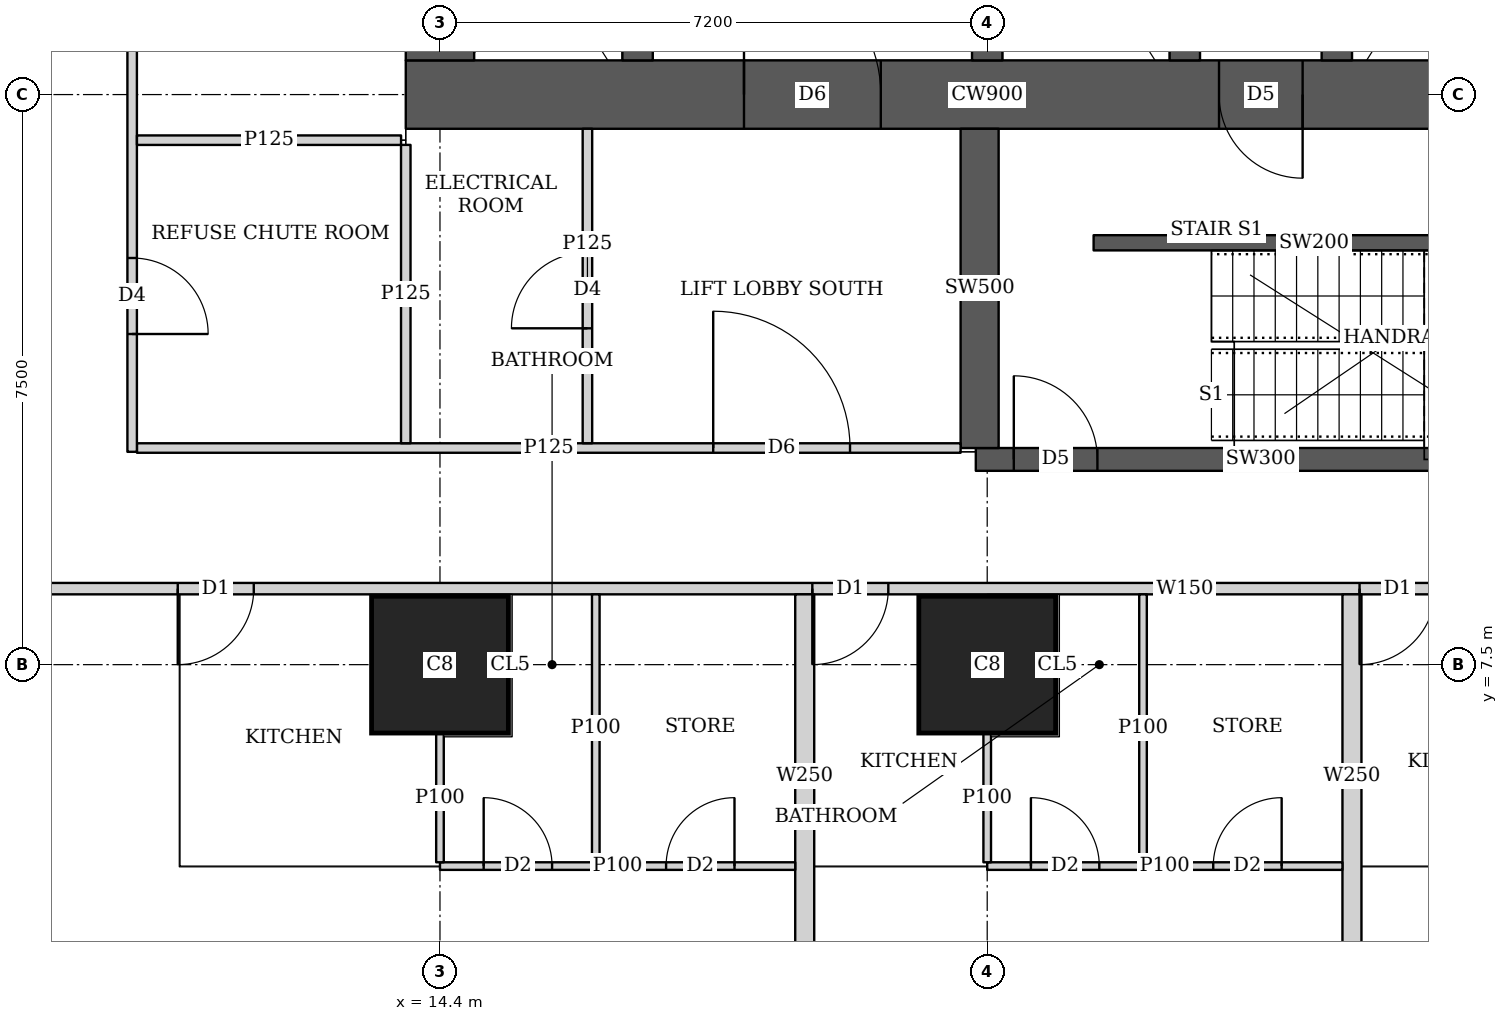
"""IFC4 building model, lengths in metres.
Left out: names, types, materials, properties, quantities, classifications, styles, units other than length and angle.
Written with IfcOpenShell. Run it as: python <this file> out.ifc"""

import sys

from ifc_helpers import new_model, si_unit, direction, frame, frame_2d, origin, origin_2d, place, context, subcontext, project, spatial, rectangle, extrude, element, fill, save


model = new_model("IFC4")
c1 = context("Model", 3, precision=1e-05, world=origin(), true_north=direction((0.0, 1.0)))
c2 = subcontext(c1, "Body", "Model", "MODEL_VIEW")
j1 = project(units=[si_unit("LENGTHUNIT", "METRE"), si_unit("PLANEANGLEUNIT", "RADIAN")], contexts=[c1])
p1 = place(None, origin())
s1 = spatial("IfcSite", under=j1, at=p1, CompositionType="ELEMENT")
p2 = place(p1, origin())
s2 = spatial("IfcBuilding", under=s1, at=p2, CompositionType="ELEMENT")
p3 = place(p2, frame((0.0, 0.0, 65.0)))
s3 = spatial("IfcBuildingStorey", under=s2, at=p3, CompositionType="ELEMENT", Elevation=65.0)
for number, where, z_axis, x_axis in (
    (1, (14.4, 7.5, 0.0), (0.0, 0.0, 1.0), (1.0, 0.0, 0.0)),
    (2, (21.6, 7.5, 0.0), (0.0, 0.0, 1.0), (1.0, 0.0, 0.0)),
):
    element("IfcColumn", number, at=place(p3, frame(where, z_axis=z_axis, x_axis=x_axis)), inside=s3, PredefinedType="COLUMN", context=c2, shape_type="SweptSolid", body=[
        extrude(rectangle(XDim=1.8, YDim=1.8, at=origin_2d()), origin(), (0.0, 0.0, 1.0), 3.75),
    ])
p4 = place(p3, frame((13.95, 15.0, 0.0), z_axis=(0.0, 0.0, 1.0), x_axis=(1.0, 0.0, 0.0)))
e3 = element("IfcWall", 3, at=p4, inside=s3, PredefinedType="SHEAR", context=c2, shape_type="SweptSolid", body=[
    extrude(rectangle(XDim=15.3, YDim=0.9, at=frame_2d((7.65, 0.0))), origin(), (0.0, 0.0, 1.0), 3.75),
])
p5 = place(p4, frame((4.45, 0.0, 0.0)))
e4 = element("IfcOpeningElement", 4, at=p5, cuts=e3, PredefinedType="OPENING", context=c2, shape_type="SweptSolid", body=[
    extrude(rectangle(XDim=1.8, YDim=2.1, at=frame_2d((0.9, 1.05))), frame((0.0, 0.46, 0.0), z_axis=(0.0, -1.0, 0.0), x_axis=(1.0, 0.0, 0.0)), (0.0, 0.0, 1.0), 0.92),
])
p6 = place(p4, frame((10.7, 0.0, 0.0)))
e5 = element("IfcOpeningElement", 5, at=p6, cuts=e3, PredefinedType="OPENING", context=c2, shape_type="SweptSolid", body=[
    extrude(rectangle(XDim=1.1, YDim=2.1, at=frame_2d((0.55, 1.05))), frame((0.0, 0.46, 0.0), z_axis=(0.0, -1.0, 0.0), x_axis=(1.0, 0.0, 0.0)), (0.0, 0.0, 1.0), 0.92),
])
p7 = place(p3, frame((14.4, 15.45, 0.0), z_axis=(0.0, 0.0, 1.0), x_axis=(0.0, 1.0, 0.0)))
e6 = element("IfcWall", 6, at=p7, inside=s3, PredefinedType="SHEAR", context=c2, shape_type="SweptSolid", body=[
    extrude(rectangle(XDim=14.1, YDim=0.9, at=frame_2d((7.05, 0.0))), origin(), (0.0, 0.0, 1.0), 3.75),
])
p8 = place(p3, frame((17.0, 15.45, 0.0), z_axis=(0.0, 0.0, 1.0), x_axis=(0.0, 1.0, 0.0)))
e7 = element("IfcWall", 7, at=p8, inside=s3, PredefinedType="SHEAR", context=c2, shape_type="SweptSolid", body=[
    extrude(rectangle(XDim=14.1, YDim=0.4, at=frame_2d((7.05, 0.0))), origin(), (0.0, 0.0, 1.0), 3.75),
])
p9 = place(p8, frame((0.875, 0.0, 0.0)))
e8 = element("IfcOpeningElement", 8, at=p9, cuts=e7, PredefinedType="OPENING", context=c2, shape_type="SweptSolid", body=[
    extrude(rectangle(XDim=1.1, YDim=2.1, at=frame_2d((0.55, 1.05))), frame((0.0, 0.21, 0.0), z_axis=(0.0, -1.0, 0.0), x_axis=(1.0, 0.0, 0.0)), (0.0, 0.0, 1.0), 0.42),
])
p10 = place(p8, frame((4.625, 0.0, 0.0)))
e9 = element("IfcOpeningElement", 9, at=p10, cuts=e7, PredefinedType="OPENING", context=c2, shape_type="SweptSolid", body=[
    extrude(rectangle(XDim=1.1, YDim=2.1, at=frame_2d((0.55, 1.05))), frame((0.0, 0.21, 0.0), z_axis=(0.0, -1.0, 0.0), x_axis=(1.0, 0.0, 0.0)), (0.0, 0.0, 1.0), 0.42),
])
p11 = place(p8, frame((8.375, 0.0, 0.0)))
e10 = element("IfcOpeningElement", 10, at=p11, cuts=e7, PredefinedType="OPENING", context=c2, shape_type="SweptSolid", body=[
    extrude(rectangle(XDim=1.1, YDim=2.1, at=frame_2d((0.55, 1.05))), frame((0.0, 0.21, 0.0), z_axis=(0.0, -1.0, 0.0), x_axis=(1.0, 0.0, 0.0)), (0.0, 0.0, 1.0), 0.42),
])
p12 = place(p8, frame((12.125, 0.0, 0.0)))
e11 = element("IfcOpeningElement", 11, at=p12, cuts=e7, PredefinedType="OPENING", context=c2, shape_type="SweptSolid", body=[
    extrude(rectangle(XDim=1.1, YDim=2.1, at=frame_2d((0.55, 1.05))), frame((0.0, 0.21, 0.0), z_axis=(0.0, -1.0, 0.0), x_axis=(1.0, 0.0, 0.0)), (0.0, 0.0, 1.0), 0.42),
])
for number, where, z_axis, x_axis in (
    (12, (21.6, 15.45, 0.0), (0.0, 0.0, 1.0), (0.0, 1.0, 0.0)),
    (13, (24.2, 15.45, 0.0), (0.0, 0.0, 1.0), (0.0, 1.0, 0.0)),
):
    element("IfcWall", number, at=place(p3, frame(where, z_axis=z_axis, x_axis=x_axis)), inside=s3, PredefinedType="SHEAR", context=c2, shape_type="SweptSolid", body=[
        extrude(rectangle(XDim=14.1, YDim=0.4, at=frame_2d((7.05, 0.0))), origin(), (0.0, 0.0, 1.0), 3.75),
    ])
p13 = place(p3, frame((26.2, 15.45, 0.0), z_axis=(0.0, 0.0, 1.0), x_axis=(0.0, 1.0, 0.0)))
e14 = element("IfcWall", 14, at=p13, inside=s3, PredefinedType="SHEAR", context=c2, shape_type="SweptSolid", body=[
    extrude(rectangle(XDim=3.1, YDim=0.4, at=frame_2d((1.55, 0.0))), origin(), (0.0, 0.0, 1.0), 3.75),
])
p14 = place(p13, frame((0.825, 0.0, 0.0)))
e15 = element("IfcOpeningElement", 15, at=p14, cuts=e14, PredefinedType="OPENING", context=c2, shape_type="SweptSolid", body=[
    extrude(rectangle(XDim=1.2, YDim=2.1, at=frame_2d((0.6, 1.05))), frame((0.0, 0.21, 0.0), z_axis=(0.0, -1.0, 0.0), x_axis=(1.0, 0.0, 0.0)), (0.0, 0.0, 1.0), 0.42),
])
p15 = place(p3, frame((21.45, 10.2, 0.0), z_axis=(0.0, 0.0, 1.0), x_axis=(1.0, 0.0, 0.0)))
e16 = element("IfcWall", 16, at=p15, inside=s3, PredefinedType="SHEAR", context=c2, shape_type="SweptSolid", body=[
    extrude(rectangle(XDim=7.5, YDim=0.3, at=frame_2d((3.75, 0.0))), origin(), (0.0, 0.0, 1.0), 3.75),
])
p16 = place(p15, frame((0.5, 0.0, 0.0)))
e17 = element("IfcOpeningElement", 17, at=p16, cuts=e16, PredefinedType="OPENING", context=c2, shape_type="SweptSolid", body=[
    extrude(rectangle(XDim=1.1, YDim=2.1, at=frame_2d((0.55, 1.05))), frame((0.0, 0.16, 0.0), z_axis=(0.0, -1.0, 0.0), x_axis=(1.0, 0.0, 0.0)), (0.0, 0.0, 1.0), 0.32),
])
p17 = place(p3, frame((21.5, 10.35, 0.0), z_axis=(0.0, 0.0, 1.0), x_axis=(0.0, 1.0, 0.0)))
e18 = element("IfcWall", 18, at=p17, inside=s3, PredefinedType="SHEAR", context=c2, shape_type="SweptSolid", body=[
    extrude(rectangle(XDim=4.2, YDim=0.5, at=frame_2d((2.1, 0.0))), origin(), (0.0, 0.0, 1.0), 3.75),
])
p18 = place(p3, frame((40.054, 8.5, 0.0), z_axis=(0.0, 0.0, 1.0), x_axis=(-1.0, 0.0, 0.0)))
e19 = element("IfcWall", 19, at=p18, inside=s3, PredefinedType="SOLIDWALL", context=c2, shape_type="SweptSolid", body=[
    extrude(rectangle(XDim=31.704, YDim=0.15, at=frame_2d((15.852, 0.0))), origin(), (0.0, 0.0, 1.0), 3.5),
])
p19 = place(p18, frame((28.104, 0.0, 0.0)))
e20 = element("IfcOpeningElement", 20, at=p19, cuts=e19, PredefinedType="OPENING", context=c2, shape_type="SweptSolid", body=[
    extrude(rectangle(XDim=1.0, YDim=2.1, at=frame_2d((0.5, 1.05))), frame((0.0, 0.085, 0.0), z_axis=(0.0, -1.0, 0.0), x_axis=(1.0, 0.0, 0.0)), (0.0, 0.0, 1.0), 0.17),
])
p20 = place(p18, frame((19.755, 0.0, 0.0)))
e21 = element("IfcOpeningElement", 21, at=p20, cuts=e19, PredefinedType="OPENING", context=c2, shape_type="SweptSolid", body=[
    extrude(rectangle(XDim=1.0, YDim=2.1, at=frame_2d((0.5, 1.05))), frame((0.0, 0.085, 0.0), z_axis=(0.0, -1.0, 0.0), x_axis=(1.0, 0.0, 0.0)), (0.0, 0.0, 1.0), 0.17),
])
p21 = place(p18, frame((12.555, 0.0, 0.0)))
e22 = element("IfcOpeningElement", 22, at=p21, cuts=e19, PredefinedType="OPENING", context=c2, shape_type="SweptSolid", body=[
    extrude(rectangle(XDim=1.0, YDim=2.1, at=frame_2d((0.5, 1.05))), frame((0.0, 0.085, 0.0), z_axis=(0.0, -1.0, 0.0), x_axis=(1.0, 0.0, 0.0)), (0.0, 0.0, 1.0), 0.17),
])
p22 = place(p18, frame((5.355, 0.0, 0.0)))
e23 = element("IfcOpeningElement", 23, at=p22, cuts=e19, PredefinedType="OPENING", context=c2, shape_type="SweptSolid", body=[
    extrude(rectangle(XDim=1.0, YDim=2.1, at=frame_2d((0.5, 1.05))), frame((0.0, 0.085, 0.0), z_axis=(0.0, -1.0, 0.0), x_axis=(1.0, 0.0, 0.0)), (0.0, 0.0, 1.0), 0.17),
])
p23 = place(p3, frame((19.074, 4.85, 0.0), z_axis=(0.0, 0.0, 1.0), x_axis=(-1.0, 0.0, 0.0)))
e24 = element("IfcWall", 24, at=p23, inside=s3, PredefinedType="PARTITIONING", context=c2, shape_type="SweptSolid", body=[
    extrude(rectangle(XDim=4.674, YDim=0.1, at=frame_2d((2.337, 0.0))), origin(), (0.0, 0.0, 1.0), 3.5),
])
p24 = place(p23, frame((3.199, 0.0, 0.0)))
e25 = element("IfcOpeningElement", 25, at=p24, cuts=e24, PredefinedType="OPENING", context=c2, shape_type="SweptSolid", body=[
    extrude(rectangle(XDim=0.9, YDim=2.1, at=frame_2d((0.45, 1.05))), frame((0.0, 0.06, 0.0), z_axis=(0.0, -1.0, 0.0), x_axis=(1.0, 0.0, 0.0)), (0.0, 0.0, 1.0), 0.12),
])
p25 = place(p23, frame((0.799, 0.0, 0.0)))
e26 = element("IfcOpeningElement", 26, at=p25, cuts=e24, PredefinedType="OPENING", context=c2, shape_type="SweptSolid", body=[
    extrude(rectangle(XDim=0.9, YDim=2.1, at=frame_2d((0.45, 1.05))), frame((0.0, 0.06, 0.0), z_axis=(0.0, -1.0, 0.0), x_axis=(1.0, 0.0, 0.0)), (0.0, 0.0, 1.0), 0.12),
])
p26 = place(p3, frame((14.4, 4.9, 0.0), z_axis=(0.0, 0.0, 1.0), x_axis=(0.0, 1.0, 0.0)))
e27 = element("IfcWall", 27, at=p26, inside=s3, PredefinedType="PARTITIONING", context=c2, shape_type="SweptSolid", body=[
    extrude(rectangle(XDim=1.699, YDim=0.1, at=frame_2d((0.85, 0.0))), origin(), (0.0, 0.0, 1.0), 3.5),
])
p27 = place(p3, frame((16.45, 4.9, 0.0), z_axis=(0.0, 0.0, 1.0), x_axis=(0.0, 1.0, 0.0)))
e28 = element("IfcWall", 28, at=p27, inside=s3, PredefinedType="PARTITIONING", context=c2, shape_type="SweptSolid", body=[
    extrude(rectangle(XDim=3.525, YDim=0.1, at=frame_2d((1.763, 0.0))), origin(), (0.0, 0.0, 1.0), 3.5),
])
p28 = place(p3, frame((26.274, 4.85, 0.0), z_axis=(0.0, 0.0, 1.0), x_axis=(-1.0, 0.0, 0.0)))
e29 = element("IfcWall", 29, at=p28, inside=s3, PredefinedType="PARTITIONING", context=c2, shape_type="SweptSolid", body=[
    extrude(rectangle(XDim=4.674, YDim=0.1, at=frame_2d((2.337, 0.0))), origin(), (0.0, 0.0, 1.0), 3.5),
])
p29 = place(p28, frame((3.199, 0.0, 0.0)))
e30 = element("IfcOpeningElement", 30, at=p29, cuts=e29, PredefinedType="OPENING", context=c2, shape_type="SweptSolid", body=[
    extrude(rectangle(XDim=0.9, YDim=2.1, at=frame_2d((0.45, 1.05))), frame((0.0, 0.06, 0.0), z_axis=(0.0, -1.0, 0.0), x_axis=(1.0, 0.0, 0.0)), (0.0, 0.0, 1.0), 0.12),
])
p30 = place(p28, frame((0.8, 0.0, 0.0)))
e31 = element("IfcOpeningElement", 31, at=p30, cuts=e29, PredefinedType="OPENING", context=c2, shape_type="SweptSolid", body=[
    extrude(rectangle(XDim=0.9, YDim=2.1, at=frame_2d((0.45, 1.05))), frame((0.0, 0.06, 0.0), z_axis=(0.0, -1.0, 0.0), x_axis=(1.0, 0.0, 0.0)), (0.0, 0.0, 1.0), 0.12),
])
p31 = place(p3, frame((21.6, 4.9, 0.0), z_axis=(0.0, 0.0, 1.0), x_axis=(0.0, 1.0, 0.0)))
e32 = element("IfcWall", 32, at=p31, inside=s3, PredefinedType="PARTITIONING", context=c2, shape_type="SweptSolid", body=[
    extrude(rectangle(XDim=1.699, YDim=0.1, at=frame_2d((0.85, 0.0))), origin(), (0.0, 0.0, 1.0), 3.5),
])
p32 = place(p3, frame((23.65, 4.9, 0.0), z_axis=(0.0, 0.0, 1.0), x_axis=(0.0, 1.0, 0.0)))
e33 = element("IfcWall", 33, at=p32, inside=s3, PredefinedType="PARTITIONING", context=c2, shape_type="SweptSolid", body=[
    extrude(rectangle(XDim=3.525, YDim=0.1, at=frame_2d((1.763, 0.0))), origin(), (0.0, 0.0, 1.0), 3.5),
])
for number, where, z_axis, x_axis in (
    (34, (19.199, 3.65, 0.0), (0.0, 0.0, 1.0), (0.0, 1.0, 0.0)),
    (35, (26.399, 3.65, 0.0), (0.0, 0.0, 1.0), (0.0, 1.0, 0.0)),
):
    element("IfcWall", number, at=place(p3, frame(where, z_axis=z_axis, x_axis=x_axis)), inside=s3, PredefinedType="SOLIDWALL", context=c2, shape_type="SweptSolid", body=[
        extrude(rectangle(XDim=4.775, YDim=0.25, at=frame_2d((2.388, 0.0))), origin(), (0.0, 0.0, 1.0), 3.5),
    ])
p33 = place(p3, frame((10.35, 10.3, 0.0), z_axis=(0.0, 0.0, 1.0), x_axis=(0.0, 1.0, 0.0)))
e36 = element("IfcWall", 36, at=p33, inside=s3, PredefinedType="PARTITIONING", context=c2, shape_type="SweptSolid", body=[
    extrude(rectangle(XDim=24.4, YDim=0.125, at=frame_2d((12.2, 0.0))), origin(), (0.0, 0.0, 1.0), 3.5),
])
p34 = place(p33, frame((1.55, 0.0, 0.0)))
e37 = element("IfcOpeningElement", 37, at=p34, cuts=e36, PredefinedType="OPENING", context=c2, shape_type="SweptSolid", body=[
    extrude(rectangle(XDim=1.0, YDim=2.1, at=frame_2d((0.5, 1.05))), frame((0.0, 0.073, 0.0), z_axis=(0.0, -1.0, 0.0), x_axis=(1.0, 0.0, 0.0)), (0.0, 0.0, 1.0), 0.145),
])
p35 = place(p33, frame((7.65, 0.0, 0.0)))
e38 = element("IfcOpeningElement", 38, at=p35, cuts=e36, PredefinedType="OPENING", context=c2, shape_type="SweptSolid", body=[
    extrude(rectangle(XDim=1.0, YDim=2.1, at=frame_2d((0.5, 1.05))), frame((0.0, 0.073, 0.0), z_axis=(0.0, -1.0, 0.0), x_axis=(1.0, 0.0, 0.0)), (0.0, 0.0, 1.0), 0.145),
])
p36 = place(p33, frame((15.75, 0.0, 0.0)))
e39 = element("IfcOpeningElement", 39, at=p36, cuts=e36, PredefinedType="OPENING", context=c2, shape_type="SweptSolid", body=[
    extrude(rectangle(XDim=1.0, YDim=2.1, at=frame_2d((0.5, 1.05))), frame((0.0, 0.073, 0.0), z_axis=(0.0, -1.0, 0.0), x_axis=(1.0, 0.0, 0.0)), (0.0, 0.0, 1.0), 0.145),
])
p37 = place(p33, frame((21.85, 0.0, 0.0)))
e40 = element("IfcOpeningElement", 40, at=p37, cuts=e36, PredefinedType="OPENING", context=c2, shape_type="SweptSolid", body=[
    extrude(rectangle(XDim=1.0, YDim=2.1, at=frame_2d((0.5, 1.05))), frame((0.0, 0.073, 0.0), z_axis=(0.0, -1.0, 0.0), x_axis=(1.0, 0.0, 0.0)), (0.0, 0.0, 1.0), 0.145),
])
p38 = place(p3, frame((10.413, 14.4, 0.0), z_axis=(0.0, 0.0, 1.0), x_axis=(1.0, 0.0, 0.0)))
e41 = element("IfcWall", 41, at=p38, inside=s3, PredefinedType="PARTITIONING", context=c2, shape_type="SweptSolid", body=[
    extrude(rectangle(XDim=3.475, YDim=0.125, at=frame_2d((1.737, 0.0))), origin(), (0.0, 0.0, 1.0), 3.5),
])
p39 = place(p3, frame((13.95, 10.413, 0.0), z_axis=(0.0, 0.0, 1.0), x_axis=(0.0, 1.0, 0.0)))
e42 = element("IfcWall", 42, at=p39, inside=s3, PredefinedType="PARTITIONING", context=c2, shape_type="SweptSolid", body=[
    extrude(rectangle(XDim=3.925, YDim=0.125, at=frame_2d((1.962, 0.0))), origin(), (0.0, 0.0, 1.0), 3.5),
])
p40 = place(p3, frame((10.413, 10.35, 0.0), z_axis=(0.0, 0.0, 1.0), x_axis=(1.0, 0.0, 0.0)))
e43 = element("IfcWall", 43, at=p40, inside=s3, PredefinedType="PARTITIONING", context=c2, shape_type="SweptSolid", body=[
    extrude(rectangle(XDim=10.837, YDim=0.125, at=frame_2d((5.418, 0.0))), origin(), (0.0, 0.0, 1.0), 3.5),
])
p41 = place(p40, frame((7.582, 0.0, 0.0)))
e44 = element("IfcOpeningElement", 44, at=p41, cuts=e43, PredefinedType="OPENING", context=c2, shape_type="SweptSolid", body=[
    extrude(rectangle(XDim=1.8, YDim=2.1, at=frame_2d((0.9, 1.05))), frame((0.0, 0.073, 0.0), z_axis=(0.0, -1.0, 0.0), x_axis=(1.0, 0.0, 0.0)), (0.0, 0.0, 1.0), 0.145),
])
p42 = place(p3, frame((16.34, 10.413, 0.0), z_axis=(0.0, 0.0, 1.0), x_axis=(0.0, 1.0, 0.0)))
e45 = element("IfcWall", 45, at=p42, inside=s3, PredefinedType="PARTITIONING", context=c2, shape_type="SweptSolid", body=[
    extrude(rectangle(XDim=4.137, YDim=0.125, at=frame_2d((2.068, 0.0))), origin(), (0.0, 0.0, 1.0), 3.5),
])
p43 = place(p42, frame((1.512, 0.0, 0.0)))
e46 = element("IfcOpeningElement", 46, at=p43, cuts=e45, PredefinedType="OPENING", context=c2, shape_type="SweptSolid", body=[
    extrude(rectangle(XDim=1.0, YDim=2.1, at=frame_2d((0.5, 1.05))), frame((0.0, 0.073, 0.0), z_axis=(0.0, -1.0, 0.0), x_axis=(1.0, 0.0, 0.0)), (0.0, 0.0, 1.0), 0.145),
])
p44 = place(p3, frame((23.0, 13.05, 0.0), z_axis=(0.0, 0.0, 1.0), x_axis=(1.0, 0.0, 0.0)))
e47 = element("IfcWall", 47, at=p44, inside=s3, PredefinedType="SHEAR", context=c2, shape_type="SweptSolid", body=[
    extrude(rectangle(XDim=5.8, YDim=0.2, at=frame_2d((2.9, 0.0))), origin(), (0.0, 0.0, 1.0), 3.75),
])
p45 = place(p24, origin())
e48 = element("IfcDoor", 48, at=p45, inside=s3, OperationType="SINGLE_SWING_LEFT", PredefinedType="DOOR", context=c2, shape_type="SweptSolid", body=[
    extrude(rectangle(XDim=0.9, YDim=2.1, at=frame_2d((0.45, 1.05))), frame((0.0, 0.025, 0.0), z_axis=(0.0, -1.0, 0.0), x_axis=(1.0, 0.0, 0.0)), (0.0, 0.0, 1.0), 0.05),
])
fill(e25, e48)
p46 = place(p25, origin())
e49 = element("IfcDoor", 49, at=p46, inside=s3, OperationType="SINGLE_SWING_RIGHT", PredefinedType="DOOR", context=c2, shape_type="SweptSolid", body=[
    extrude(rectangle(XDim=0.9, YDim=2.1, at=frame_2d((0.45, 1.05))), frame((0.0, 0.025, 0.0), z_axis=(0.0, -1.0, 0.0), x_axis=(1.0, 0.0, 0.0)), (0.0, 0.0, 1.0), 0.05),
])
fill(e26, e49)
p47 = place(p19, origin())
e50 = element("IfcDoor", 50, at=p47, inside=s3, OperationType="SINGLE_SWING_RIGHT", PredefinedType="DOOR", context=c2, shape_type="SweptSolid", body=[
    extrude(rectangle(XDim=1.0, YDim=2.1, at=frame_2d((0.5, 1.05))), frame((0.0, 0.025, 0.0), z_axis=(0.0, -1.0, 0.0), x_axis=(1.0, 0.0, 0.0)), (0.0, 0.0, 1.0), 0.05),
])
fill(e20, e50)
p48 = place(p29, origin())
e51 = element("IfcDoor", 51, at=p48, inside=s3, OperationType="SINGLE_SWING_LEFT", PredefinedType="DOOR", context=c2, shape_type="SweptSolid", body=[
    extrude(rectangle(XDim=0.9, YDim=2.1, at=frame_2d((0.45, 1.05))), frame((0.0, 0.025, 0.0), z_axis=(0.0, -1.0, 0.0), x_axis=(1.0, 0.0, 0.0)), (0.0, 0.0, 1.0), 0.05),
])
fill(e30, e51)
p49 = place(p30, origin())
e52 = element("IfcDoor", 52, at=p49, inside=s3, OperationType="SINGLE_SWING_RIGHT", PredefinedType="DOOR", context=c2, shape_type="SweptSolid", body=[
    extrude(rectangle(XDim=0.9, YDim=2.1, at=frame_2d((0.45, 1.05))), frame((0.0, 0.025, 0.0), z_axis=(0.0, -1.0, 0.0), x_axis=(1.0, 0.0, 0.0)), (0.0, 0.0, 1.0), 0.05),
])
fill(e31, e52)
p50 = place(p20, origin())
e53 = element("IfcDoor", 53, at=p50, inside=s3, OperationType="SINGLE_SWING_RIGHT", PredefinedType="DOOR", context=c2, shape_type="SweptSolid", body=[
    extrude(rectangle(XDim=1.0, YDim=2.1, at=frame_2d((0.5, 1.05))), frame((0.0, 0.025, 0.0), z_axis=(0.0, -1.0, 0.0), x_axis=(1.0, 0.0, 0.0)), (0.0, 0.0, 1.0), 0.05),
])
fill(e21, e53)
p51 = place(p21, origin())
e54 = element("IfcDoor", 54, at=p51, inside=s3, OperationType="SINGLE_SWING_RIGHT", PredefinedType="DOOR", context=c2, shape_type="SweptSolid", body=[
    extrude(rectangle(XDim=1.0, YDim=2.1, at=frame_2d((0.5, 1.05))), frame((0.0, 0.025, 0.0), z_axis=(0.0, -1.0, 0.0), x_axis=(1.0, 0.0, 0.0)), (0.0, 0.0, 1.0), 0.05),
])
fill(e22, e54)
p52 = place(p34, origin())
e55 = element("IfcDoor", 55, at=p52, inside=s3, OperationType="SINGLE_SWING_RIGHT", PredefinedType="DOOR", context=c2, shape_type="SweptSolid", body=[
    extrude(rectangle(XDim=1.0, YDim=2.1, at=frame_2d((0.5, 1.05))), frame((0.0, 0.025, 0.0), z_axis=(0.0, -1.0, 0.0), x_axis=(1.0, 0.0, 0.0)), (0.0, 0.0, 1.0), 0.05),
])
fill(e37, e55)
p53 = place(p43, origin())
e56 = element("IfcDoor", 56, at=p53, inside=s3, OperationType="SINGLE_SWING_LEFT", PredefinedType="DOOR", context=c2, shape_type="SweptSolid", body=[
    extrude(rectangle(XDim=1.0, YDim=2.1, at=frame_2d((0.5, 1.05))), frame((0.0, 0.025, 0.0), z_axis=(0.0, -1.0, 0.0), x_axis=(1.0, 0.0, 0.0)), (0.0, 0.0, 1.0), 0.05),
])
fill(e46, e56)
p54 = place(p41, origin())
e57 = element("IfcDoor", 57, at=p54, inside=s3, OperationType="DOUBLE_DOOR_SINGLE_SWING", PredefinedType="DOOR", context=c2, shape_type="SweptSolid", body=[
    extrude(rectangle(XDim=1.8, YDim=2.1, at=frame_2d((0.9, 1.05))), frame((0.0, 0.025, 0.0), z_axis=(0.0, -1.0, 0.0), x_axis=(1.0, 0.0, 0.0)), (0.0, 0.0, 1.0), 0.05),
])
fill(e44, e57)
p55 = place(p5, origin())
e58 = element("IfcDoor", 58, at=p55, inside=s3, OperationType="DOUBLE_DOOR_SINGLE_SWING", PredefinedType="DOOR", context=c2, shape_type="SweptSolid", body=[
    extrude(rectangle(XDim=1.8, YDim=2.1, at=frame_2d((0.9, 1.05))), frame((0.0, 0.025, 0.0), z_axis=(0.0, -1.0, 0.0), x_axis=(1.0, 0.0, 0.0)), (0.0, 0.0, 1.0), 0.05),
])
fill(e4, e58)
p56 = place(p6, origin())
e59 = element("IfcDoor", 59, at=p56, inside=s3, OperationType="SINGLE_SWING_LEFT", PredefinedType="DOOR", context=c2, shape_type="SweptSolid", body=[
    extrude(rectangle(XDim=1.1, YDim=2.1, at=frame_2d((0.55, 1.05))), frame((0.0, 0.025, 0.0), z_axis=(0.0, -1.0, 0.0), x_axis=(1.0, 0.0, 0.0)), (0.0, 0.0, 1.0), 0.05),
])
fill(e5, e59)
p57 = place(p16, origin())
e60 = element("IfcDoor", 60, at=p57, inside=s3, OperationType="SINGLE_SWING_LEFT", PredefinedType="DOOR", context=c2, shape_type="SweptSolid", body=[
    extrude(rectangle(XDim=1.1, YDim=2.1, at=frame_2d((0.55, 1.05))), frame((0.0, 0.025, 0.0), z_axis=(0.0, -1.0, 0.0), x_axis=(1.0, 0.0, 0.0)), (0.0, 0.0, 1.0), 0.05),
])
fill(e17, e60)
save(model, sys.argv[1])
